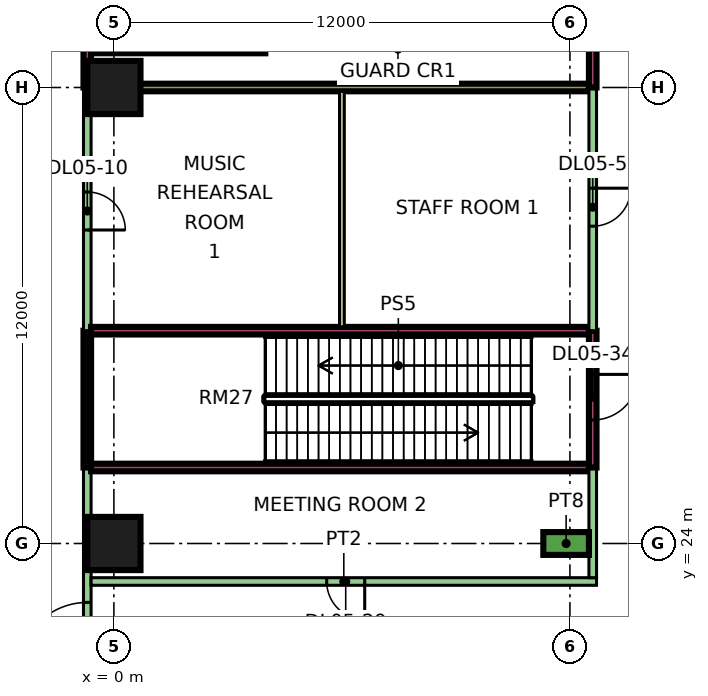
"""IFC4 building model, lengths in metres.
Left out: names, types, materials, properties, quantities, classifications, styles, units other than length and angle.
Written with IfcOpenShell. Run it as: python <this file> out.ifc"""

import sys

from ifc_helpers import new_model, si_unit, direction, frame, frame_2d, origin, origin_2d, place, context, subcontext, project, spatial, rectangle, extrude, element, fill, save


model = new_model("IFC4")
c1 = context("Model", 3, precision=1e-05, world=origin(), true_north=direction((0.0, 1.0)))
c2 = subcontext(c1, "Body", "Model", "MODEL_VIEW")
j1 = project(units=[si_unit("LENGTHUNIT", "METRE"), si_unit("PLANEANGLEUNIT", "RADIAN")], contexts=[c1])
p1 = place(None, origin())
s1 = spatial("IfcSite", under=j1, at=p1, CompositionType="ELEMENT")
p2 = place(p1, origin())
s2 = spatial("IfcBuilding", under=s1, at=p2, CompositionType="ELEMENT")
p3 = place(p2, frame((0.0, 0.0, 26.4)))
s3 = spatial("IfcBuildingStorey", under=s2, at=p3, CompositionType="ELEMENT", Elevation=26.4)
for number, where, z_axis, x_axis in (
    (1, (0.0, 24.0, 0.0), (0.0, 0.0, 1.0), (1.0, 0.0, 0.0)),
    (2, (0.0, 36.0, 0.0), (0.0, 0.0, 1.0), (1.0, 0.0, 0.0)),
):
    element("IfcColumn", number, at=place(p3, frame(where, z_axis=z_axis, x_axis=x_axis)), inside=s3, PredefinedType="COLUMN", context=c2, shape_type="SweptSolid", body=[
        extrude(rectangle(XDim=1.4, YDim=1.4, at=origin_2d()), origin(), (0.0, 0.0, 1.0), 9.0),
    ])
p4 = place(p3, frame((-0.7, 10.15, 0.0), z_axis=(0.0, 0.0, 1.0), x_axis=(0.0, 1.0, 0.0)))
e3 = element("IfcWall", 3, at=p4, inside=s3, PredefinedType="PARTITIONING", context=c2, shape_type="SweptSolid", body=[
    extrude(rectangle(XDim=15.85, YDim=0.2, at=frame_2d((7.925, 0.0))), origin(), (0.0, 0.0, 1.0), 8.45),
])
p5 = place(p4, frame((10.5, 0.0, 0.0)))
e4 = element("IfcOpeningElement", 4, at=p5, cuts=e3, PredefinedType="OPENING", context=c2, shape_type="SweptSolid", body=[
    extrude(rectangle(XDim=1.8, YDim=2.1, at=frame_2d((0.9, 1.05))), frame((0.0, 0.11, 0.0), z_axis=(0.0, -1.0, 0.0), x_axis=(1.0, 0.0, 0.0)), (0.0, 0.0, 1.0), 0.22),
])
p6 = place(p4, frame((4.5, 0.0, 0.0)))
e5 = element("IfcOpeningElement", 5, at=p6, cuts=e3, PredefinedType="OPENING", context=c2, shape_type="SweptSolid", body=[
    extrude(rectangle(XDim=1.0, YDim=2.1, at=frame_2d((0.5, 1.05))), frame((0.0, 0.11, 0.0), z_axis=(0.0, -1.0, 0.0), x_axis=(1.0, 0.0, 0.0)), (0.0, 0.0, 1.0), 0.22),
])
p7 = place(p3, frame((-0.7, 26.0, 0.0), z_axis=(0.0, 0.0, 1.0), x_axis=(0.0, 1.0, 0.0)))
e6 = element("IfcWall", 6, at=p7, inside=s3, PredefinedType="SOLIDWALL", context=c2, shape_type="SweptSolid", body=[
    extrude(rectangle(XDim=3.6, YDim=0.2, at=frame_2d((1.8, 0.0))), origin(), (0.0, 0.0, 1.0), 8.45),
])
p8 = place(p3, frame((-0.7, 29.6, 0.0), z_axis=(0.0, 0.0, 1.0), x_axis=(0.0, 1.0, 0.0)))
e7 = element("IfcWall", 7, at=p8, inside=s3, PredefinedType="PARTITIONING", context=c2, shape_type="SweptSolid", body=[
    extrude(rectangle(XDim=6.4, YDim=0.2, at=frame_2d((3.2, 0.0))), origin(), (0.0, 0.0, 1.0), 8.45),
])
p9 = place(p8, frame((2.65, 0.0, 0.0)))
e8 = element("IfcOpeningElement", 8, at=p9, cuts=e7, PredefinedType="OPENING", context=c2, shape_type="SweptSolid", body=[
    extrude(rectangle(XDim=1.0, YDim=2.1, at=frame_2d((0.5, 1.05))), frame((0.0, 0.11, 0.0), z_axis=(0.0, -1.0, 0.0), x_axis=(1.0, 0.0, 0.0)), (0.0, 0.0, 1.0), 0.22),
])
p10 = place(p3, frame((-0.7, 36.0, 0.0), z_axis=(0.0, 0.0, 1.0), x_axis=(0.0, 1.0, 0.0)))
e9 = element("IfcWall", 9, at=p10, inside=s3, PredefinedType="SOLIDWALL", context=c2, shape_type="SweptSolid", body=[
    extrude(rectangle(XDim=4.6, YDim=0.2, at=frame_2d((2.3, 0.0))), origin(), (0.0, 0.0, 1.0), 8.45),
])
p11 = place(p3, frame((-0.6, 23.0, 0.0), z_axis=(0.0, 0.0, 1.0), x_axis=(1.0, 0.0, 0.0)))
e10 = element("IfcWall", 10, at=p11, inside=s3, PredefinedType="PARTITIONING", context=c2, shape_type="SweptSolid", body=[
    extrude(rectangle(XDim=13.3, YDim=0.2, at=frame_2d((6.65, 0.0))), origin(), (0.0, 0.0, 1.0), 8.45),
])
p12 = place(p11, frame((6.2, 0.0, 0.0)))
e11 = element("IfcOpeningElement", 11, at=p12, cuts=e10, PredefinedType="OPENING", context=c2, shape_type="SweptSolid", body=[
    extrude(rectangle(XDim=1.0, YDim=2.1, at=frame_2d((0.5, 1.05))), frame((0.0, 0.11, 0.0), z_axis=(0.0, -1.0, 0.0), x_axis=(1.0, 0.0, 0.0)), (0.0, 0.0, 1.0), 0.22),
])
for number, where, z_axis, x_axis in (
    (12, (-0.6, 26.0, 0.0), (0.0, 0.0, 1.0), (1.0, 0.0, 0.0)),
    (13, (-0.6, 29.6, 0.0), (0.0, 0.0, 1.0), (1.0, 0.0, 0.0)),
):
    element("IfcWall", number, at=place(p3, frame(where, z_axis=z_axis, x_axis=x_axis)), inside=s3, PredefinedType="SOLIDWALL", context=c2, shape_type="SweptSolid", body=[
        extrude(rectangle(XDim=13.1, YDim=0.2, at=frame_2d((6.55, 0.0))), origin(), (0.0, 0.0, 1.0), 8.45),
    ])
p13 = place(p3, frame((-0.6, 36.0, 0.0), z_axis=(0.0, 0.0, 1.0), x_axis=(1.0, 0.0, 0.0)))
e14 = element("IfcWall", 14, at=p13, inside=s3, PredefinedType="SOLIDWALL", context=c2, shape_type="SweptSolid", body=[
    extrude(rectangle(XDim=13.1, YDim=0.2, at=frame_2d((6.55, 0.0))), origin(), (0.0, 0.0, 1.0), 6.55),
])
p14 = place(p3, frame((6.0, 29.7, 0.0), z_axis=(0.0, 0.0, 1.0), x_axis=(0.0, 1.0, 0.0)))
e15 = element("IfcWall", 15, at=p14, inside=s3, PredefinedType="PARTITIONING", context=c2, shape_type="SweptSolid", body=[
    extrude(rectangle(XDim=6.2, YDim=0.125, at=frame_2d((3.1, 0.0))), origin(), (0.0, 0.0, 1.0), 8.45),
])
p15 = place(p3, frame((12.6, 23.1, 0.0), z_axis=(0.0, 0.0, 1.0), x_axis=(0.0, 1.0, 0.0)))
e16 = element("IfcWall", 16, at=p15, inside=s3, PredefinedType="PARTITIONING", context=c2, shape_type="SweptSolid", body=[
    extrude(rectangle(XDim=2.9, YDim=0.2, at=frame_2d((1.45, 0.0))), origin(), (0.0, 0.0, 1.0), 8.45),
])
p16 = place(p3, frame((12.6, 26.0, 0.0), z_axis=(0.0, 0.0, 1.0), x_axis=(0.0, 1.0, 0.0)))
e17 = element("IfcWall", 17, at=p16, inside=s3, PredefinedType="SOLIDWALL", context=c2, shape_type="SweptSolid", body=[
    extrude(rectangle(XDim=3.6, YDim=0.2, at=frame_2d((1.8, 0.0))), origin(), (0.0, 0.0, 1.0), 8.45),
])
p17 = place(p16, frame((1.25, 0.0, 0.0)))
e18 = element("IfcOpeningElement", 18, at=p17, cuts=e17, PredefinedType="OPENING", context=c2, shape_type="SweptSolid", body=[
    extrude(rectangle(XDim=1.2, YDim=2.1, at=frame_2d((0.6, 1.05))), frame((0.0, 0.11, 0.0), z_axis=(0.0, -1.0, 0.0), x_axis=(1.0, 0.0, 0.0)), (0.0, 0.0, 1.0), 0.22),
])
p18 = place(p3, frame((12.6, 29.6, 0.0), z_axis=(0.0, 0.0, 1.0), x_axis=(0.0, 1.0, 0.0)))
e19 = element("IfcWall", 19, at=p18, inside=s3, PredefinedType="PARTITIONING", context=c2, shape_type="SweptSolid", body=[
    extrude(rectangle(XDim=6.4, YDim=0.2, at=frame_2d((3.2, 0.0))), origin(), (0.0, 0.0, 1.0), 8.45),
])
p19 = place(p18, frame((2.75, 0.0, 0.0)))
e20 = element("IfcOpeningElement", 20, at=p19, cuts=e19, PredefinedType="OPENING", context=c2, shape_type="SweptSolid", body=[
    extrude(rectangle(XDim=1.0, YDim=2.1, at=frame_2d((0.5, 1.05))), frame((0.0, 0.11, 0.0), z_axis=(0.0, -1.0, 0.0), x_axis=(1.0, 0.0, 0.0)), (0.0, 0.0, 1.0), 0.22),
])
p20 = place(p3, frame((12.6, 36.0, 0.0), z_axis=(0.0, 0.0, 1.0), x_axis=(0.0, 1.0, 0.0)))
e21 = element("IfcWall", 21, at=p20, inside=s3, PredefinedType="SOLIDWALL", context=c2, shape_type="SweptSolid", body=[
    extrude(rectangle(XDim=4.6, YDim=0.2, at=frame_2d((2.3, 0.0))), origin(), (0.0, 0.0, 1.0), 8.45),
])
p21 = place(p20, frame((2.25, 0.0, 0.0)))
e22 = element("IfcOpeningElement", 22, at=p21, cuts=e21, PredefinedType="OPENING", context=c2, shape_type="SweptSolid", body=[
    extrude(rectangle(XDim=1.2, YDim=2.1, at=frame_2d((0.6, 1.05))), frame((0.0, 0.11, 0.0), z_axis=(0.0, -1.0, 0.0), x_axis=(1.0, 0.0, 0.0)), (0.0, 0.0, 1.0), 0.22),
])
p22 = place(p3, frame((11.3, 24.0, 0.0), z_axis=(0.0, 0.0, 1.0), x_axis=(1.0, 0.0, 0.0)))
e23 = element("IfcWall", 23, at=p22, inside=s3, PredefinedType="SOLIDWALL", context=c2, shape_type="SweptSolid", body=[
    extrude(rectangle(XDim=1.2, YDim=0.6, at=frame_2d((0.6, 0.0))), origin(), (0.0, 0.0, 1.0), 6.55),
])
p23 = place(p3, frame((-0.6, 37.0, 0.0), z_axis=(0.0, 0.0, 1.0), x_axis=(1.0, 0.0, 0.0)))
e24 = element("IfcWall", 24, at=p23, inside=s3, PredefinedType="SOLIDWALL", context=c2, shape_type="SweptSolid", body=[
    extrude(rectangle(XDim=4.585, YDim=0.2, at=frame_2d((2.292, 0.0))), origin(), (0.0, 0.0, 1.0), 8.45),
])
p24 = place(p19, origin())
e25 = element("IfcDoor", 25, at=p24, inside=s3, OperationType="SINGLE_SWING_RIGHT", PredefinedType="DOOR", context=c2, shape_type="SweptSolid", body=[
    extrude(rectangle(XDim=1.0, YDim=2.1, at=frame_2d((0.5, 1.05))), frame((0.0, 0.025, 0.0), z_axis=(0.0, -1.0, 0.0), x_axis=(1.0, 0.0, 0.0)), (0.0, 0.0, 1.0), 0.05),
])
fill(e20, e25)
p25 = place(p9, frame((1.0, 0.0, 0.0), z_axis=(0.0, 0.0, 1.0), x_axis=(-1.0, 0.0, 0.0)))
e26 = element("IfcDoor", 26, at=p25, inside=s3, OperationType="SINGLE_SWING_LEFT", PredefinedType="DOOR", context=c2, shape_type="SweptSolid", body=[
    extrude(rectangle(XDim=1.0, YDim=2.1, at=frame_2d((0.5, 1.05))), frame((0.0, 0.025, 0.0), z_axis=(0.0, -1.0, 0.0), x_axis=(1.0, 0.0, 0.0)), (0.0, 0.0, 1.0), 0.05),
])
fill(e8, e26)
p26 = place(p5, origin())
e27 = element("IfcDoor", 27, at=p26, inside=s3, OperationType="DOUBLE_DOOR_SINGLE_SWING", PredefinedType="DOOR", context=c2, shape_type="SweptSolid", body=[
    extrude(rectangle(XDim=1.8, YDim=2.1, at=frame_2d((0.9, 1.05))), frame((0.0, 0.025, 0.0), z_axis=(0.0, -1.0, 0.0), x_axis=(1.0, 0.0, 0.0)), (0.0, 0.0, 1.0), 0.05),
])
fill(e4, e27)
p27 = place(p12, origin())
e28 = element("IfcDoor", 28, at=p27, inside=s3, OperationType="SINGLE_SWING_RIGHT", PredefinedType="DOOR", context=c2, shape_type="SweptSolid", body=[
    extrude(rectangle(XDim=1.0, YDim=2.1, at=frame_2d((0.5, 1.05))), frame((0.0, 0.025, 0.0), z_axis=(0.0, -1.0, 0.0), x_axis=(1.0, 0.0, 0.0)), (0.0, 0.0, 1.0), 0.05),
])
fill(e11, e28)
p28 = place(p17, origin())
e29 = element("IfcDoor", 29, at=p28, inside=s3, OperationType="SINGLE_SWING_RIGHT", PredefinedType="DOOR", context=c2, shape_type="SweptSolid", body=[
    extrude(rectangle(XDim=1.2, YDim=2.1, at=frame_2d((0.6, 1.05))), frame((0.0, 0.025, 0.0), z_axis=(0.0, -1.0, 0.0), x_axis=(1.0, 0.0, 0.0)), (0.0, 0.0, 1.0), 0.05),
])
fill(e18, e29)
save(model, sys.argv[1])
